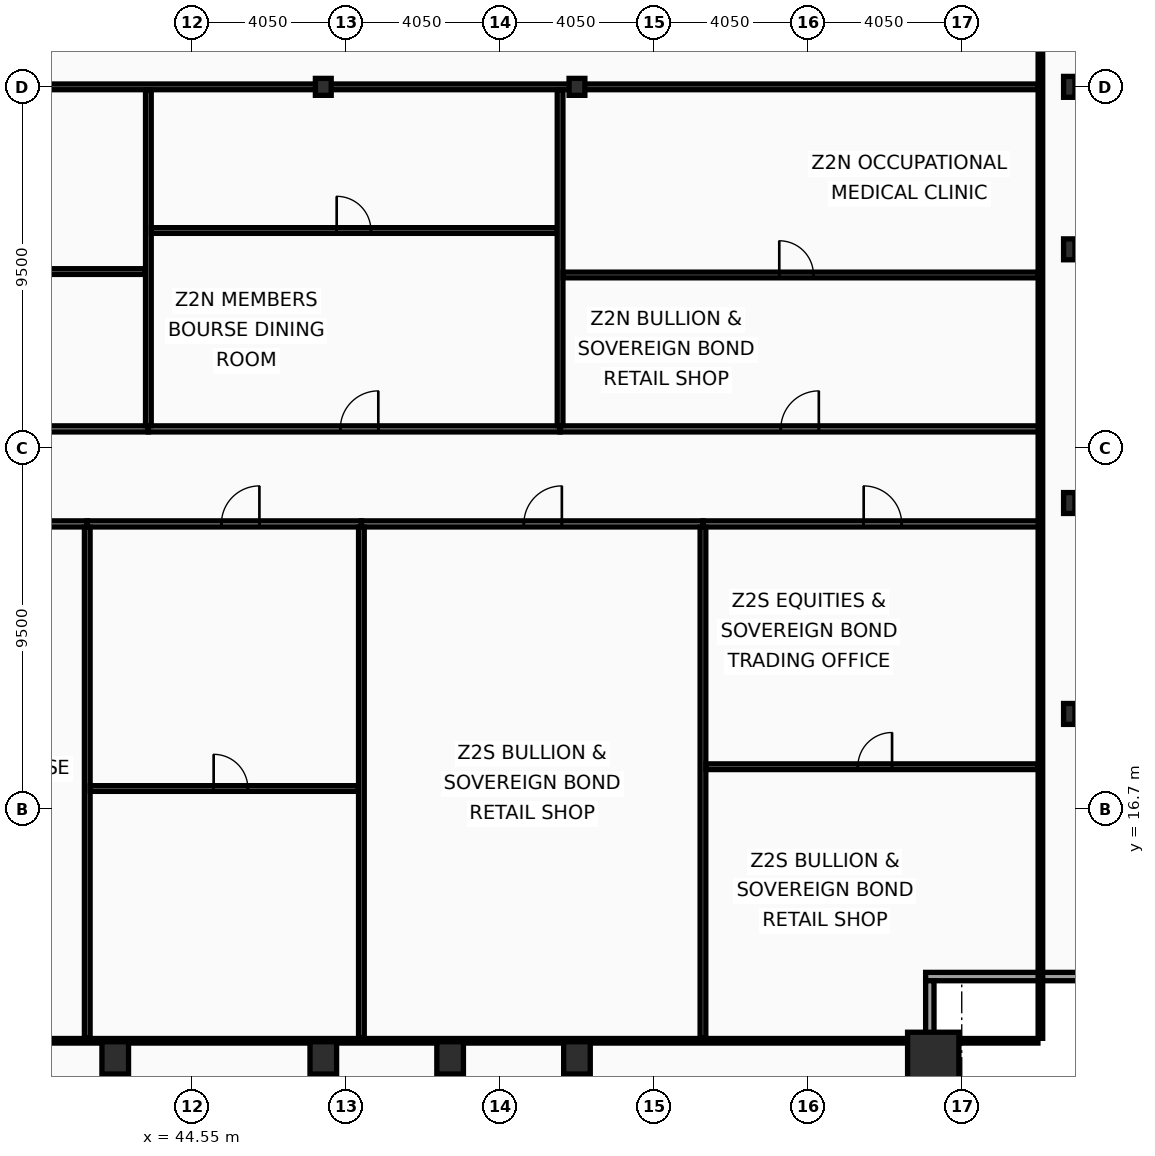
"""IFC4 building model, lengths in metres.
Left out: names, types, materials, properties, quantities, classifications, styles, units other than length and angle.
Written with IfcOpenShell. Run it as: python <this file> out.ifc"""

import sys

from ifc_helpers import new_model, si_unit, direction, frame, frame_2d, origin, origin_2d, place, context, subcontext, project, spatial, rectangle, hollow_rectangle, i_section, extrude, element, fill, save


model = new_model("IFC4")
c1 = context("Model", 3, precision=1e-05, world=origin(), true_north=direction((0.0, 1.0)))
c2 = subcontext(c1, "Body", "Model", "MODEL_VIEW")
j1 = project(units=[si_unit("LENGTHUNIT", "METRE"), si_unit("PLANEANGLEUNIT", "RADIAN")], contexts=[c1])
p1 = place(None, origin())
s1 = spatial("IfcSite", under=j1, at=p1, CompositionType="ELEMENT")
p2 = place(p1, origin())
s2 = spatial("IfcBuilding", under=s1, at=p2, CompositionType="ELEMENT")
p3 = place(p2, frame((0.0, 0.0, 143.4)))
s3 = spatial("IfcBuildingStorey", under=s2, at=p3, CompositionType="ELEMENT", Elevation=143.4)
p4 = place(p3, frame((64.05, 10.15, 0.0), z_axis=(0.0, 0.0, 1.0), x_axis=(1.0, 0.0, 0.0)))
e1 = element("IfcColumn", 1, at=p4, inside=s3, PredefinedType="COLUMN", context=c2, shape_type="SweptSolid", body=[
    extrude(hollow_rectangle(XDim=1.35, YDim=1.35, WallThickness=0.065, at=origin_2d()), origin(), (0.0, 0.0, 1.0), 3.6),
])
for number, where, z_axis, x_axis in (
    (2, (42.525, 10.15, 0.0), (0.0, 0.0, 1.0), (1.0, 0.0, 0.0)),
    (3, (48.0, 10.15, 0.0), (0.0, 0.0, 1.0), (1.0, 0.0, 0.0)),
    (4, (51.337, 10.15, 0.0), (0.0, 0.0, 1.0), (1.0, 0.0, 0.0)),
    (5, (54.675, 10.15, 0.0), (0.0, 0.0, 1.0), (1.0, 0.0, 0.0)),
):
    element("IfcColumn", number, at=place(p3, frame(where, z_axis=z_axis, x_axis=x_axis)), inside=s3, PredefinedType="COLUMN", context=c2, shape_type="SweptSolid", body=[
        extrude(hollow_rectangle(XDim=0.7, YDim=0.85, WallThickness=0.05, at=origin_2d()), origin(), (0.0, 0.0, 1.0), 3.6),
    ])
for number, where, z_axis, x_axis in (
    (6, (67.63, 19.2, 0.0), (0.0, 0.0, 1.0), (1.0, 0.0, 0.0)),
    (7, (67.63, 24.75, 0.0), (0.0, 0.0, 1.0), (1.0, 0.0, 0.0)),
    (8, (67.63, 31.425, 0.0), (0.0, 0.0, 1.0), (1.0, 0.0, 0.0)),
    (9, (67.63, 35.7, 0.0), (0.0, 0.0, 1.0), (1.0, 0.0, 0.0)),
):
    element("IfcColumn", number, at=place(p3, frame(where, z_axis=z_axis, x_axis=x_axis)), inside=s3, PredefinedType="COLUMN", context=c2, shape_type="SweptSolid", body=[
        extrude(i_section(OverallWidth=0.3, OverallDepth=0.55, WebThickness=0.015, FlangeThickness=0.029, at=origin_2d()), origin(), (0.0, 0.0, 1.0), 3.6),
    ])
for number, where, z_axis, x_axis in (
    (10, (48.0, 35.7, 0.0), (0.0, 0.0, 1.0), (1.0, 0.0, 0.0)),
    (11, (54.675, 35.7, 0.0), (0.0, 0.0, 1.0), (1.0, 0.0, 0.0)),
):
    element("IfcColumn", number, at=place(p3, frame(where, z_axis=z_axis, x_axis=x_axis)), inside=s3, PredefinedType="COLUMN", context=c2, shape_type="SweptSolid", body=[
        extrude(i_section(OverallWidth=0.416, OverallDepth=0.446, WebThickness=0.039, FlangeThickness=0.063, at=origin_2d()), origin(), (0.0, 0.0, 1.0), 3.6),
    ])
p5 = place(p3, frame((68.07, 12.29, 0.0), z_axis=(0.0, 0.0, 1.0), x_axis=(-1.0, 0.0, 0.0)))
e12 = element("IfcWall", 12, at=p5, inside=s3, PredefinedType="SOLIDWALL", context=c2, shape_type="SweptSolid", body=[
    extrude(rectangle(XDim=4.22, YDim=0.22, at=frame_2d((2.11, 0.0))), origin(), (0.0, 0.0, 1.0), 2.83),
])
p6 = place(p3, frame((63.96, 12.18, 0.0), z_axis=(0.0, 0.0, 1.0), x_axis=(0.0, -1.0, 0.0)))
e13 = element("IfcWall", 13, at=p6, inside=s3, PredefinedType="SOLIDWALL", context=c2, shape_type="SweptSolid", body=[
    extrude(rectangle(XDim=3.91, YDim=0.22, at=frame_2d((1.955, 0.0))), origin(), (0.0, 0.0, 1.0), 2.83),
])
p7 = place(p3, frame((34.886, 24.2, 0.0), z_axis=(0.0, 0.0, 1.0), x_axis=(1.0, 0.0, 0.0)))
e14 = element("IfcWall", 14, at=p7, inside=s3, PredefinedType="PARTITIONING", context=c2, shape_type="SweptSolid", body=[
    extrude(rectangle(XDim=6.902, YDim=0.16, at=frame_2d((3.451, 0.0))), origin(), (0.0, 0.0, 1.0), 3.44),
])
p8 = place(p7, frame((3.399, 0.0, 0.0)))
e15 = element("IfcOpeningElement", 15, at=p8, cuts=e14, PredefinedType="OPENING", context=c2, shape_type="SweptSolid", body=[
    extrude(rectangle(XDim=1.0, YDim=2.05, at=frame_2d((0.5, 1.025))), frame((0.0, 0.09, 0.0), z_axis=(0.0, -1.0, 0.0), x_axis=(1.0, 0.0, 0.0)), (0.0, 0.0, 1.0), 0.18),
])
p9 = place(p3, frame((41.789, 24.2, 0.0), z_axis=(0.0, 0.0, 1.0), x_axis=(1.0, 0.0, 0.0)))
e16 = element("IfcWall", 16, at=p9, inside=s3, PredefinedType="PARTITIONING", context=c2, shape_type="SweptSolid", body=[
    extrude(rectangle(XDim=7.214, YDim=0.16, at=frame_2d((3.607, 0.0))), origin(), (0.0, 0.0, 1.0), 2.73),
])
p10 = place(p9, frame((3.53, 0.0, 0.0)))
e17 = element("IfcOpeningElement", 17, at=p10, cuts=e16, PredefinedType="OPENING", context=c2, shape_type="SweptSolid", body=[
    extrude(rectangle(XDim=1.0, YDim=2.05, at=frame_2d((0.5, 1.025))), frame((0.0, 0.09, 0.0), z_axis=(0.0, -1.0, 0.0), x_axis=(1.0, 0.0, 0.0)), (0.0, 0.0, 1.0), 0.18),
])
p11 = place(p3, frame((41.789, 10.665, 0.0), z_axis=(0.0, 0.0, 1.0), x_axis=(0.0, 1.0, 0.0)))
e18 = element("IfcWall", 18, at=p11, inside=s3, PredefinedType="PARTITIONING", context=c2, shape_type="SweptSolid", body=[
    extrude(rectangle(XDim=13.45, YDim=0.15, at=frame_2d((6.725, 0.0))), origin(), (0.0, 0.0, 1.0), 2.93),
])
p12 = place(p3, frame((41.869, 17.238, 0.0), z_axis=(0.0, 0.0, 1.0), x_axis=(1.0, 0.0, 0.0)))
e19 = element("IfcWall", 19, at=p12, inside=s3, PredefinedType="PARTITIONING", context=c2, shape_type="SweptSolid", body=[
    extrude(rectangle(XDim=7.054, YDim=0.15, at=frame_2d((3.527, 0.0))), origin(), (0.0, 0.0, 1.0), 2.73),
])
p13 = place(p12, frame((3.246, 0.0, 0.0)))
e20 = element("IfcOpeningElement", 20, at=p13, cuts=e19, PredefinedType="OPENING", context=c2, shape_type="SweptSolid", body=[
    extrude(rectangle(XDim=0.9, YDim=2.05, at=frame_2d((0.45, 1.025))), frame((0.0, 0.085, 0.0), z_axis=(0.0, -1.0, 0.0), x_axis=(1.0, 0.0, 0.0)), (0.0, 0.0, 1.0), 0.17),
])
p14 = place(p3, frame((49.003, 24.2, 0.0), z_axis=(0.0, 0.0, 1.0), x_axis=(1.0, 0.0, 0.0)))
e21 = element("IfcWall", 21, at=p14, inside=s3, PredefinedType="PARTITIONING", context=c2, shape_type="SweptSolid", body=[
    extrude(rectangle(XDim=8.988, YDim=0.16, at=frame_2d((4.494, 0.0))), origin(), (0.0, 0.0, 1.0), 2.73),
])
p15 = place(p14, frame((4.275, 0.0, 0.0)))
e22 = element("IfcOpeningElement", 22, at=p15, cuts=e21, PredefinedType="OPENING", context=c2, shape_type="SweptSolid", body=[
    extrude(rectangle(XDim=1.0, YDim=2.05, at=frame_2d((0.5, 1.025))), frame((0.0, 0.09, 0.0), z_axis=(0.0, -1.0, 0.0), x_axis=(1.0, 0.0, 0.0)), (0.0, 0.0, 1.0), 0.18),
])
p16 = place(p3, frame((49.003, 10.665, 0.0), z_axis=(0.0, 0.0, 1.0), x_axis=(0.0, 1.0, 0.0)))
e23 = element("IfcWall", 23, at=p16, inside=s3, PredefinedType="PARTITIONING", context=c2, shape_type="SweptSolid", body=[
    extrude(rectangle(XDim=13.45, YDim=0.15, at=frame_2d((6.725, 0.0))), origin(), (0.0, 0.0, 1.0), 2.93),
])
p17 = place(p3, frame((57.99, 24.2, 0.0), z_axis=(0.0, 0.0, 1.0), x_axis=(1.0, 0.0, 0.0)))
e24 = element("IfcWall", 24, at=p17, inside=s3, PredefinedType="PARTITIONING", context=c2, shape_type="SweptSolid", body=[
    extrude(rectangle(XDim=8.88, YDim=0.16, at=frame_2d((4.44, 0.0))), origin(), (0.0, 0.0, 1.0), 3.44),
])
p18 = place(p17, frame((4.229, 0.0, 0.0)))
e25 = element("IfcOpeningElement", 25, at=p18, cuts=e24, PredefinedType="OPENING", context=c2, shape_type="SweptSolid", body=[
    extrude(rectangle(XDim=1.0, YDim=2.05, at=frame_2d((0.5, 1.025))), frame((0.0, 0.09, 0.0), z_axis=(0.0, -1.0, 0.0), x_axis=(1.0, 0.0, 0.0)), (0.0, 0.0, 1.0), 0.18),
])
p19 = place(p3, frame((57.99, 10.665, 0.0), z_axis=(0.0, 0.0, 1.0), x_axis=(0.0, 1.0, 0.0)))
e26 = element("IfcWall", 26, at=p19, inside=s3, PredefinedType="PARTITIONING", context=c2, shape_type="SweptSolid", body=[
    extrude(rectangle(XDim=13.45, YDim=0.15, at=frame_2d((6.725, 0.0))), origin(), (0.0, 0.0, 1.0), 2.73),
])
p20 = place(p3, frame((58.07, 17.811, 0.0), z_axis=(0.0, 0.0, 1.0), x_axis=(1.0, 0.0, 0.0)))
e27 = element("IfcWall", 27, at=p20, inside=s3, PredefinedType="PARTITIONING", context=c2, shape_type="SweptSolid", body=[
    extrude(rectangle(XDim=8.735, YDim=0.15, at=frame_2d((4.367, 0.0))), origin(), (0.0, 0.0, 1.0), 2.83),
])
p21 = place(p20, frame((3.996, 0.0, 0.0)))
e28 = element("IfcOpeningElement", 28, at=p21, cuts=e27, PredefinedType="OPENING", context=c2, shape_type="SweptSolid", body=[
    extrude(rectangle(XDim=0.9, YDim=2.05, at=frame_2d((0.45, 1.025))), frame((0.0, 0.085, 0.0), z_axis=(0.0, -1.0, 0.0), x_axis=(1.0, 0.0, 0.0)), (0.0, 0.0, 1.0), 0.17),
])
p22 = place(p3, frame((21.81, 35.7, 0.0), z_axis=(0.0, 0.0, 1.0), x_axis=(1.0, 0.0, 0.0)))
e29 = element("IfcWall", 29, at=p22, inside=s3, PredefinedType="PARTITIONING", context=c2, shape_type="SweptSolid", body=[
    extrude(rectangle(XDim=44.995, YDim=0.15, at=frame_2d((22.498, 0.0))), origin(), (0.0, 0.0, 1.0), 2.73),
])
p23 = place(p3, frame((33.466, 26.7, 0.0), z_axis=(0.0, 0.0, 1.0), x_axis=(1.0, 0.0, 0.0)))
e30 = element("IfcWall", 30, at=p23, inside=s3, PredefinedType="PARTITIONING", context=c2, shape_type="SweptSolid", body=[
    extrude(rectangle(XDim=9.931, YDim=0.16, at=frame_2d((4.965, 0.0))), origin(), (0.0, 0.0, 1.0), 2.73),
])
p24 = place(p23, frame((4.671, 0.0, 0.0)))
e31 = element("IfcOpeningElement", 31, at=p24, cuts=e30, PredefinedType="OPENING", context=c2, shape_type="SweptSolid", body=[
    extrude(rectangle(XDim=1.0, YDim=2.05, at=frame_2d((0.5, 1.025))), frame((0.0, 0.09, 0.0), z_axis=(0.0, -1.0, 0.0), x_axis=(1.0, 0.0, 0.0)), (0.0, 0.0, 1.0), 0.18),
])
p25 = place(p3, frame((33.546, 30.84, 0.0), z_axis=(0.0, 0.0, 1.0), x_axis=(1.0, 0.0, 0.0)))
e32 = element("IfcWall", 32, at=p25, inside=s3, PredefinedType="PARTITIONING", context=c2, shape_type="SweptSolid", body=[
    extrude(rectangle(XDim=9.771, YDim=0.15, at=frame_2d((4.885, 0.0))), origin(), (0.0, 0.0, 1.0), 2.73),
])
p26 = place(p25, frame((4.469, 0.0, 0.0)))
e33 = element("IfcOpeningElement", 33, at=p26, cuts=e32, PredefinedType="OPENING", context=c2, shape_type="SweptSolid", body=[
    extrude(rectangle(XDim=0.9, YDim=2.05, at=frame_2d((0.45, 1.025))), frame((0.0, 0.085, 0.0), z_axis=(0.0, -1.0, 0.0), x_axis=(1.0, 0.0, 0.0)), (0.0, 0.0, 1.0), 0.17),
])
p27 = place(p3, frame((43.397, 26.7, 0.0), z_axis=(0.0, 0.0, 1.0), x_axis=(1.0, 0.0, 0.0)))
e34 = element("IfcWall", 34, at=p27, inside=s3, PredefinedType="PARTITIONING", context=c2, shape_type="SweptSolid", body=[
    extrude(rectangle(XDim=10.833, YDim=0.16, at=frame_2d((5.417, 0.0))), origin(), (0.0, 0.0, 1.0), 2.73),
])
p28 = place(p27, frame((5.05, 0.0, 0.0)))
e35 = element("IfcOpeningElement", 35, at=p28, cuts=e34, PredefinedType="OPENING", context=c2, shape_type="SweptSolid", body=[
    extrude(rectangle(XDim=1.0, YDim=2.05, at=frame_2d((0.5, 1.025))), frame((0.0, 0.09, 0.0), z_axis=(0.0, -1.0, 0.0), x_axis=(1.0, 0.0, 0.0)), (0.0, 0.0, 1.0), 0.18),
])
p29 = place(p3, frame((43.397, 26.785, 0.0), z_axis=(0.0, 0.0, 1.0), x_axis=(0.0, 1.0, 0.0)))
e36 = element("IfcWall", 36, at=p29, inside=s3, PredefinedType="PARTITIONING", context=c2, shape_type="SweptSolid", body=[
    extrude(rectangle(XDim=8.835, YDim=0.15, at=frame_2d((4.417, 0.0))), origin(), (0.0, 0.0, 1.0), 2.93),
])
p30 = place(p3, frame((43.477, 31.92, 0.0), z_axis=(0.0, 0.0, 1.0), x_axis=(1.0, 0.0, 0.0)))
e37 = element("IfcWall", 37, at=p30, inside=s3, PredefinedType="PARTITIONING", context=c2, shape_type="SweptSolid", body=[
    extrude(rectangle(XDim=10.674, YDim=0.15, at=frame_2d((5.337, 0.0))), origin(), (0.0, 0.0, 1.0), 2.73),
])
p31 = place(p30, frame((4.875, 0.0, 0.0)))
e38 = element("IfcOpeningElement", 38, at=p31, cuts=e37, PredefinedType="OPENING", context=c2, shape_type="SweptSolid", body=[
    extrude(rectangle(XDim=0.9, YDim=2.05, at=frame_2d((0.45, 1.025))), frame((0.0, 0.085, 0.0), z_axis=(0.0, -1.0, 0.0), x_axis=(1.0, 0.0, 0.0)), (0.0, 0.0, 1.0), 0.17),
])
p32 = place(p3, frame((54.231, 26.7, 0.0), z_axis=(0.0, 0.0, 1.0), x_axis=(1.0, 0.0, 0.0)))
e39 = element("IfcWall", 39, at=p32, inside=s3, PredefinedType="PARTITIONING", context=c2, shape_type="SweptSolid", body=[
    extrude(rectangle(XDim=12.639, YDim=0.16, at=frame_2d((6.32, 0.0))), origin(), (0.0, 0.0, 1.0), 2.73),
])
p33 = place(p32, frame((5.809, 0.0, 0.0)))
e40 = element("IfcOpeningElement", 40, at=p33, cuts=e39, PredefinedType="OPENING", context=c2, shape_type="SweptSolid", body=[
    extrude(rectangle(XDim=1.0, YDim=2.05, at=frame_2d((0.5, 1.025))), frame((0.0, 0.09, 0.0), z_axis=(0.0, -1.0, 0.0), x_axis=(1.0, 0.0, 0.0)), (0.0, 0.0, 1.0), 0.18),
])
p34 = place(p3, frame((54.231, 26.785, 0.0), z_axis=(0.0, 0.0, 1.0), x_axis=(0.0, 1.0, 0.0)))
e41 = element("IfcWall", 41, at=p34, inside=s3, PredefinedType="PARTITIONING", context=c2, shape_type="SweptSolid", body=[
    extrude(rectangle(XDim=8.835, YDim=0.15, at=frame_2d((4.417, 0.0))), origin(), (0.0, 0.0, 1.0), 2.73),
])
p35 = place(p3, frame((54.311, 30.75, 0.0), z_axis=(0.0, 0.0, 1.0), x_axis=(1.0, 0.0, 0.0)))
e42 = element("IfcWall", 42, at=p35, inside=s3, PredefinedType="PARTITIONING", context=c2, shape_type="SweptSolid", body=[
    extrude(rectangle(XDim=12.494, YDim=0.15, at=frame_2d((6.247, 0.0))), origin(), (0.0, 0.0, 1.0), 2.73),
])
p36 = place(p35, frame((5.688, 0.0, 0.0)))
e43 = element("IfcOpeningElement", 43, at=p36, cuts=e42, PredefinedType="OPENING", context=c2, shape_type="SweptSolid", body=[
    extrude(rectangle(XDim=0.9, YDim=2.05, at=frame_2d((0.45, 1.025))), frame((0.0, 0.085, 0.0), z_axis=(0.0, -1.0, 0.0), x_axis=(1.0, 0.0, 0.0)), (0.0, 0.0, 1.0), 0.17),
])
p37 = place(p3, frame((66.87, 10.665, 0.0), z_axis=(0.0, 0.0, 1.0), x_axis=(0.0, 1.0, 0.0)))
e44 = element("IfcWall", 44, at=p37, inside=s3, PredefinedType="PARTITIONING", context=c2, shape_type="SweptSolid", body=[
    extrude(rectangle(XDim=42.11, YDim=0.12, at=frame_2d((21.055, 0.0))), origin(), (0.0, 0.0, 1.0), 2.73),
])
p38 = place(p3, frame((6.095, 10.6, 0.0), z_axis=(0.0, 0.0, 1.0), x_axis=(1.0, 0.0, 0.0)))
e45 = element("IfcWall", 45, at=p38, inside=s3, PredefinedType="PARTITIONING", context=c2, shape_type="SweptSolid", body=[
    extrude(rectangle(XDim=60.71, YDim=0.12, at=frame_2d((30.355, 0.0))), origin(), (0.0, 0.0, 1.0), 2.73),
])
p39 = place(p10, origin())
e46 = element("IfcDoor", 46, at=p39, inside=s3, OperationType="SINGLE_SWING_RIGHT", PredefinedType="DOOR", context=c2, shape_type="SweptSolid", body=[
    extrude(rectangle(XDim=1.0, YDim=2.05, at=frame_2d((0.5, 1.025))), frame((0.0, 0.025, 0.0), z_axis=(0.0, -1.0, 0.0), x_axis=(1.0, 0.0, 0.0)), (0.0, 0.0, 1.0), 0.05),
])
fill(e17, e46)
p40 = place(p13, origin())
e47 = element("IfcDoor", 47, at=p40, inside=s3, OperationType="SINGLE_SWING_LEFT", PredefinedType="DOOR", context=c2, shape_type="SweptSolid", body=[
    extrude(rectangle(XDim=0.9, YDim=2.05, at=frame_2d((0.45, 1.025))), frame((0.0, 0.025, 0.0), z_axis=(0.0, -1.0, 0.0), x_axis=(1.0, 0.0, 0.0)), (0.0, 0.0, 1.0), 0.05),
])
fill(e20, e47)
p41 = place(p15, origin())
e48 = element("IfcDoor", 48, at=p41, inside=s3, OperationType="SINGLE_SWING_RIGHT", PredefinedType="DOOR", context=c2, shape_type="SweptSolid", body=[
    extrude(rectangle(XDim=1.0, YDim=2.05, at=frame_2d((0.5, 1.025))), frame((0.0, 0.025, 0.0), z_axis=(0.0, -1.0, 0.0), x_axis=(1.0, 0.0, 0.0)), (0.0, 0.0, 1.0), 0.05),
])
fill(e22, e48)
p42 = place(p18, origin())
e49 = element("IfcDoor", 49, at=p42, inside=s3, OperationType="SINGLE_SWING_LEFT", PredefinedType="DOOR", context=c2, shape_type="SweptSolid", body=[
    extrude(rectangle(XDim=1.0, YDim=2.05, at=frame_2d((0.5, 1.025))), frame((0.0, 0.025, 0.0), z_axis=(0.0, -1.0, 0.0), x_axis=(1.0, 0.0, 0.0)), (0.0, 0.0, 1.0), 0.05),
])
fill(e25, e49)
p43 = place(p21, origin())
e50 = element("IfcDoor", 50, at=p43, inside=s3, OperationType="SINGLE_SWING_RIGHT", PredefinedType="DOOR", context=c2, shape_type="SweptSolid", body=[
    extrude(rectangle(XDim=0.9, YDim=2.05, at=frame_2d((0.45, 1.025))), frame((0.0, 0.025, 0.0), z_axis=(0.0, -1.0, 0.0), x_axis=(1.0, 0.0, 0.0)), (0.0, 0.0, 1.0), 0.05),
])
fill(e28, e50)
p44 = place(p28, origin())
e51 = element("IfcDoor", 51, at=p44, inside=s3, OperationType="SINGLE_SWING_RIGHT", PredefinedType="DOOR", context=c2, shape_type="SweptSolid", body=[
    extrude(rectangle(XDim=1.0, YDim=2.05, at=frame_2d((0.5, 1.025))), frame((0.0, 0.025, 0.0), z_axis=(0.0, -1.0, 0.0), x_axis=(1.0, 0.0, 0.0)), (0.0, 0.0, 1.0), 0.05),
])
fill(e35, e51)
p45 = place(p31, origin())
e52 = element("IfcDoor", 52, at=p45, inside=s3, OperationType="SINGLE_SWING_LEFT", PredefinedType="DOOR", context=c2, shape_type="SweptSolid", body=[
    extrude(rectangle(XDim=0.9, YDim=2.05, at=frame_2d((0.45, 1.025))), frame((0.0, 0.025, 0.0), z_axis=(0.0, -1.0, 0.0), x_axis=(1.0, 0.0, 0.0)), (0.0, 0.0, 1.0), 0.05),
])
fill(e38, e52)
p46 = place(p33, origin())
e53 = element("IfcDoor", 53, at=p46, inside=s3, OperationType="SINGLE_SWING_RIGHT", PredefinedType="DOOR", context=c2, shape_type="SweptSolid", body=[
    extrude(rectangle(XDim=1.0, YDim=2.05, at=frame_2d((0.5, 1.025))), frame((0.0, 0.025, 0.0), z_axis=(0.0, -1.0, 0.0), x_axis=(1.0, 0.0, 0.0)), (0.0, 0.0, 1.0), 0.05),
])
fill(e40, e53)
p47 = place(p36, origin())
e54 = element("IfcDoor", 54, at=p47, inside=s3, OperationType="SINGLE_SWING_LEFT", PredefinedType="DOOR", context=c2, shape_type="SweptSolid", body=[
    extrude(rectangle(XDim=0.9, YDim=2.05, at=frame_2d((0.45, 1.025))), frame((0.0, 0.025, 0.0), z_axis=(0.0, -1.0, 0.0), x_axis=(1.0, 0.0, 0.0)), (0.0, 0.0, 1.0), 0.05),
])
fill(e43, e54)
save(model, sys.argv[1])
